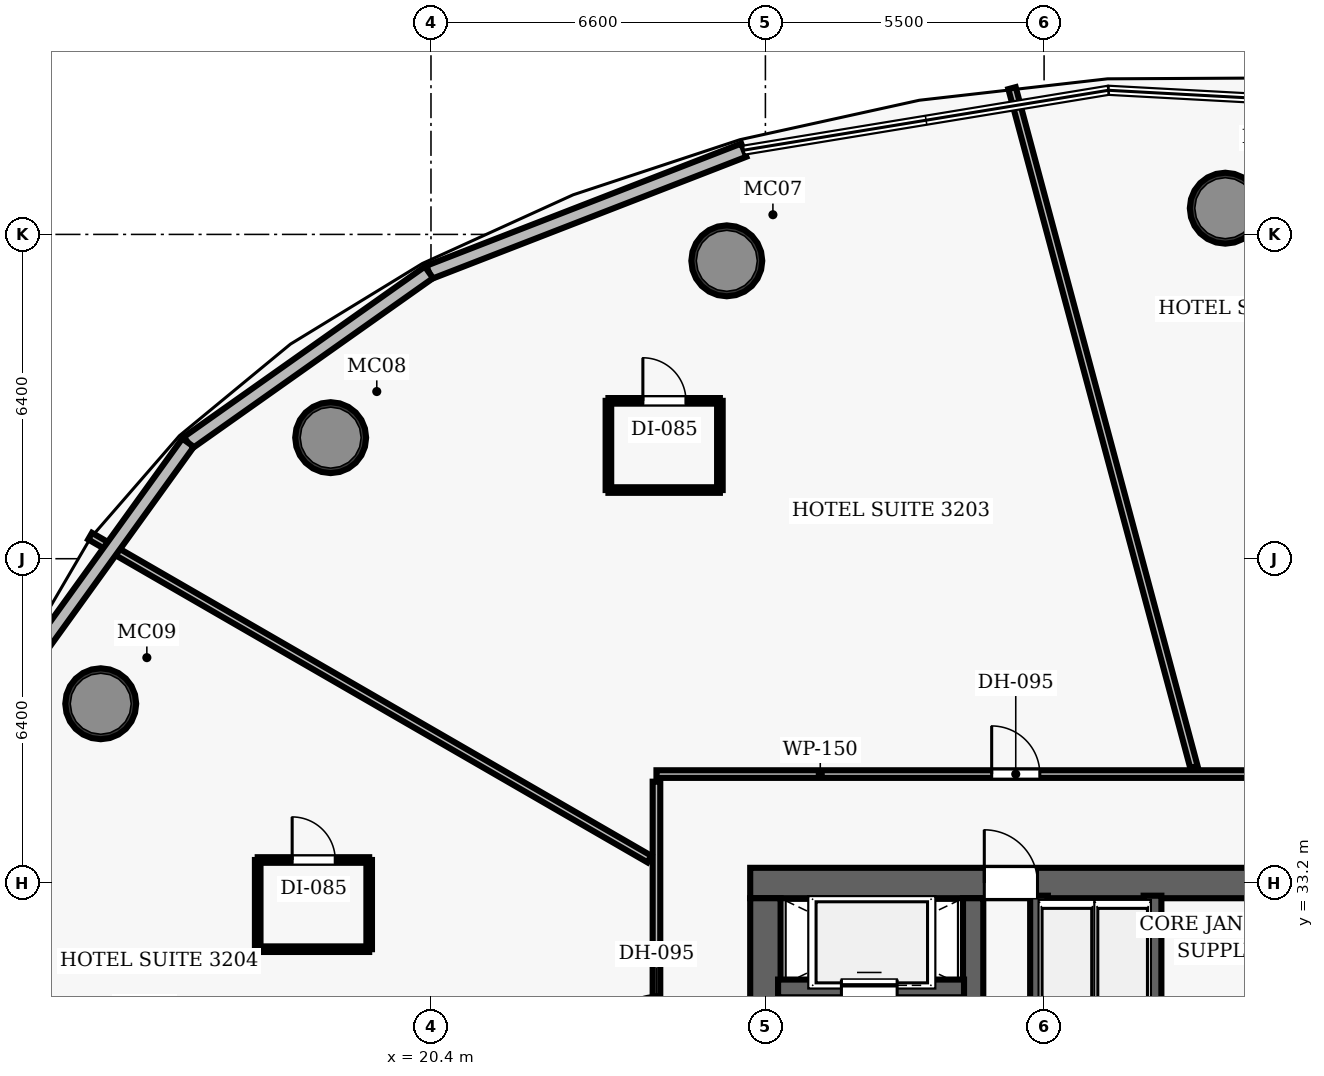
"""IFC4 building model, lengths in metres.
Left out: names, types, materials, properties, quantities, classifications, styles, units other than length and angle.
Written with IfcOpenShell. Run it as: python <this file> out.ifc"""

import sys

from ifc_helpers import new_model, si_unit, direction, frame, frame_2d, origin, origin_2d, place, context, subcontext, project, spatial, rectangle, hollow_circle, extrude, element, fill, save


model = new_model("IFC4")
c1 = context("Model", 3, precision=1e-05, world=origin(), true_north=direction((0.0, 1.0)))
c2 = subcontext(c1, "Body", "Model", "MODEL_VIEW")
j1 = project(units=[si_unit("LENGTHUNIT", "METRE"), si_unit("PLANEANGLEUNIT", "RADIAN")], contexts=[c1])
p1 = place(None, origin())
s1 = spatial("IfcSite", under=j1, at=p1, CompositionType="ELEMENT")
p2 = place(p1, origin())
s2 = spatial("IfcBuilding", under=s1, at=p2, CompositionType="ELEMENT")
p3 = place(p2, frame((0.0, 0.0, 130.8)))
s3 = spatial("IfcBuildingStorey", under=s2, at=p3, CompositionType="ELEMENT", Elevation=130.8)
p4 = place(p3, frame((26.7, 33.2, 0.0), z_axis=(0.0, 0.0, 1.0), x_axis=(1.0, 0.0, 0.0)))
e1 = element("IfcWall", 1, at=p4, inside=s3, PredefinedType="SHEAR", context=c2, shape_type="SweptSolid", body=[
    extrude(rectangle(XDim=22.6, YDim=0.6, at=frame_2d((11.3, 0.0))), origin(), (0.0, 0.0, 1.0), 3.5),
])
p5 = place(p4, frame((4.62, 0.0, 0.0)))
e2 = element("IfcOpeningElement", 2, at=p5, cuts=e1, PredefinedType="OPENING", context=c2, shape_type="SweptSolid", body=[
    extrude(rectangle(XDim=1.05, YDim=2.15, at=frame_2d((0.525, 1.075))), frame((0.0, 0.31, 0.0), z_axis=(0.0, -1.0, 0.0), x_axis=(1.0, 0.0, 0.0)), (0.0, 0.0, 1.0), 0.62),
])
p6 = place(p4, frame((14.52, 0.0, 0.0)))
e3 = element("IfcOpeningElement", 3, at=p6, cuts=e1, PredefinedType="OPENING", context=c2, shape_type="SweptSolid", body=[
    extrude(rectangle(XDim=1.05, YDim=2.15, at=frame_2d((0.525, 1.075))), frame((0.0, 0.31, 0.0), z_axis=(0.0, -1.0, 0.0), x_axis=(1.0, 0.0, 0.0)), (0.0, 0.0, 1.0), 0.62),
])
p7 = place(p3, frame((27.0, 19.1, 0.0), z_axis=(0.0, 0.0, 1.0), x_axis=(0.0, 1.0, 0.0)))
e4 = element("IfcWall", 4, at=p7, inside=s3, PredefinedType="SHEAR", context=c2, shape_type="SweptSolid", body=[
    extrude(rectangle(XDim=13.8, YDim=0.6, at=frame_2d((6.9, 0.0))), origin(), (0.0, 0.0, 1.0), 3.5),
])
p8 = place(p7, frame((8.2, 0.0, 0.0)))
e5 = element("IfcOpeningElement", 5, at=p8, cuts=e4, PredefinedType="OPENING", context=c2, shape_type="SweptSolid", body=[
    extrude(rectangle(XDim=1.05, YDim=2.15, at=frame_2d((0.525, 1.075))), frame((0.0, 0.31, 0.0), z_axis=(0.0, -1.0, 0.0), x_axis=(1.0, 0.0, 0.0)), (0.0, 0.0, 1.0), 0.62),
])
p9 = place(p3, frame((31.1, 19.1, 0.0), z_axis=(0.0, 0.0, 1.0), x_axis=(0.0, 1.0, 0.0)))
e6 = element("IfcWall", 6, at=p9, inside=s3, PredefinedType="SHEAR", context=c2, shape_type="SweptSolid", body=[
    extrude(rectangle(XDim=13.8, YDim=0.4, at=frame_2d((6.9, 0.0))), origin(), (0.0, 0.0, 1.0), 3.5),
])
for number, where, z_axis, x_axis in (
    (7, (36.076, 46.517, 0.0), (0.0, 0.0, 1.0), (1.0, 0.0, 0.0)),
    (8, (26.238, 45.479, 0.0), (0.0, 0.0, 1.0), (1.0, 0.0, 0.0)),
    (9, (18.42, 41.989, 0.0), (0.0, 0.0, 1.0), (1.0, 0.0, 0.0)),
    (10, (13.882, 36.738, 0.0), (0.0, 0.0, 1.0), (1.0, 0.0, 0.0)),
):
    element("IfcColumn", number, at=place(p3, frame(where, z_axis=z_axis, x_axis=x_axis)), inside=s3, PredefinedType="COLUMN", context=c2, shape_type="SweptSolid", body=[
        extrude(hollow_circle(Radius=0.7, WallThickness=0.055, at=origin_2d()), origin(), (0.0, 0.0, 1.0), 3.5),
    ])
p10 = place(p3, frame((27.25, 31.12, 0.0), z_axis=(0.0, 0.0, 1.0), x_axis=(1.0, 0.0, 0.0)))
e11 = element("IfcWall", 11, at=p10, inside=s3, PredefinedType="SHEAR", context=c2, shape_type="SweptSolid", body=[
    extrude(rectangle(XDim=3.67, YDim=0.35, at=frame_2d((1.835, 0.0))), origin(), (0.0, 0.0, 1.0), 2.675),
])
p11 = place(p10, frame((1.25, 0.0, 0.0)))
e12 = element("IfcOpeningElement", 12, at=p11, cuts=e11, PredefinedType="OPENING", context=c2, shape_type="SweptSolid", body=[
    extrude(rectangle(XDim=1.1, YDim=2.15, at=frame_2d((0.55, 1.075))), frame((0.0, 0.185, 0.0), z_axis=(0.0, -1.0, 0.0), x_axis=(1.0, 0.0, 0.0)), (0.0, 0.0, 1.0), 0.37),
])
p12 = place(p3, frame((34.64, 26.69, 0.0), z_axis=(0.0, 0.0, 1.0), x_axis=(0.0, 1.0, 0.0)))
e13 = element("IfcWall", 13, at=p12, inside=s3, PredefinedType="SHEAR", context=c2, shape_type="SweptSolid", body=[
    extrude(rectangle(XDim=6.26, YDim=0.35, at=frame_2d((3.13, 0.0))), origin(), (0.0, 0.0, 1.0), 3.5),
])
p13 = place(p3, frame((32.4, 30.22, 0.0), z_axis=(0.0, 0.0, 1.0), x_axis=(0.0, 1.0, 0.0)))
e14 = element("IfcWall", 14, at=p13, inside=s3, PredefinedType="SHEAR", context=c2, shape_type="SweptSolid", body=[
    extrude(rectangle(XDim=2.73, YDim=0.35, at=frame_2d((1.365, 0.0))), origin(), (0.0, 0.0, 1.0), 2.675),
])
p14 = place(p3, frame((24.85, 35.35, 0.0), z_axis=(0.0, 0.0, 1.0), x_axis=(1.0, 0.0, 0.0)))
e15 = element("IfcWall", 15, at=p14, inside=s3, PredefinedType="PARTITIONING", context=c2, shape_type="SweptSolid", body=[
    extrude(rectangle(XDim=26.0, YDim=0.15, at=frame_2d((13.0, 0.0))), origin(), (0.0, 0.0, 1.0), 2.675),
])
p15 = place(p14, frame((19.766, 0.0, 0.0)))
e16 = element("IfcOpeningElement", 16, at=p15, cuts=e15, PredefinedType="OPENING", context=c2, shape_type="SweptSolid", body=[
    extrude(rectangle(XDim=0.95, YDim=2.15, at=frame_2d((0.475, 1.075))), frame((0.0, 0.085, 0.0), z_axis=(0.0, -1.0, 0.0), x_axis=(1.0, 0.0, 0.0)), (0.0, 0.0, 1.0), 0.17),
])
p16 = place(p14, frame((12.852, 0.0, 0.0)))
e17 = element("IfcOpeningElement", 17, at=p16, cuts=e15, PredefinedType="OPENING", context=c2, shape_type="SweptSolid", body=[
    extrude(rectangle(XDim=0.95, YDim=2.15, at=frame_2d((0.475, 1.075))), frame((0.0, 0.085, 0.0), z_axis=(0.0, -1.0, 0.0), x_axis=(1.0, 0.0, 0.0)), (0.0, 0.0, 1.0), 0.17),
])
p17 = place(p14, frame((6.616, 0.0, 0.0)))
e18 = element("IfcOpeningElement", 18, at=p17, cuts=e15, PredefinedType="OPENING", context=c2, shape_type="SweptSolid", body=[
    extrude(rectangle(XDim=0.95, YDim=2.15, at=frame_2d((0.475, 1.075))), frame((0.0, 0.085, 0.0), z_axis=(0.0, -1.0, 0.0), x_axis=(1.0, 0.0, 0.0)), (0.0, 0.0, 1.0), 0.17),
])
p18 = place(p3, frame((24.85, 27.08, 0.0), z_axis=(0.0, 0.0, 1.0), x_axis=(0.0, 1.0, 0.0)))
e19 = element("IfcWall", 19, at=p18, inside=s3, PredefinedType="PARTITIONING", context=c2, shape_type="SweptSolid", body=[
    extrude(rectangle(XDim=8.12, YDim=0.15, at=frame_2d((4.06, 0.0))), origin(), (0.0, 0.0, 1.0), 2.675),
])
p19 = place(p18, frame((2.966, 0.0, 0.0)))
e20 = element("IfcOpeningElement", 20, at=p19, cuts=e19, PredefinedType="OPENING", context=c2, shape_type="SweptSolid", body=[
    extrude(rectangle(XDim=0.95, YDim=2.15, at=frame_2d((0.475, 1.075))), frame((0.0, 0.085, 0.0), z_axis=(0.0, -1.0, 0.0), x_axis=(1.0, 0.0, 0.0)), (0.0, 0.0, 1.0), 0.17),
])
p20 = place(p3, frame((35.457, 35.49, 0.0), z_axis=(0.0, 0.0, 1.0), x_axis=(-0.258816153921, 0.965926600974, 0.0)))
e21 = element("IfcWall", 21, at=p20, inside=s3, PredefinedType="PARTITIONING", context=c2, shape_type="SweptSolid", body=[
    extrude(rectangle(XDim=13.869, YDim=0.15, at=frame_2d((6.935, 0.0))), origin(), (0.0, 0.0, 1.0), 2.675),
])
p21 = place(p3, frame((24.71, 33.673, 0.0), z_axis=(0.0, 0.0, 1.0), x_axis=(-0.866028956608, 0.499993846279, 0.0)))
e22 = element("IfcWall", 22, at=p21, inside=s3, PredefinedType="PARTITIONING", context=c2, shape_type="SweptSolid", body=[
    extrude(rectangle(XDim=12.745, YDim=0.15, at=frame_2d((6.373, 0.0))), origin(), (0.0, 0.0, 1.0), 2.675),
])
p22 = place(p3, frame((23.902, 40.955, 0.0), z_axis=(0.0, 0.0, 1.0), x_axis=(1.0, 0.0, 0.0)))
e23 = element("IfcWall", 23, at=p22, inside=s3, PredefinedType="PARTITIONING", context=c2, shape_type="SweptSolid", body=[
    extrude(rectangle(XDim=2.2, YDim=0.11, at=frame_2d((1.1, 0.0))), origin(), (0.0, 0.0, 1.0), 2.675),
])
p23 = place(p3, frame((23.902, 42.715, 0.0), z_axis=(0.0, 0.0, 1.0), x_axis=(1.0, 0.0, 0.0)))
e24 = element("IfcWall", 24, at=p23, inside=s3, PredefinedType="PARTITIONING", context=c2, shape_type="SweptSolid", body=[
    extrude(rectangle(XDim=2.2, YDim=0.11, at=frame_2d((1.1, 0.0))), origin(), (0.0, 0.0, 1.0), 2.675),
])
p24 = place(p23, frame((0.68, 0.0, 0.0)))
e25 = element("IfcOpeningElement", 25, at=p24, cuts=e24, PredefinedType="OPENING", context=c2, shape_type="SweptSolid", body=[
    extrude(rectangle(XDim=0.85, YDim=2.1, at=frame_2d((0.425, 1.05))), frame((0.0, 0.065, 0.0), z_axis=(0.0, -1.0, 0.0), x_axis=(1.0, 0.0, 0.0)), (0.0, 0.0, 1.0), 0.13),
])
for number, where, z_axis, x_axis in (
    (26, (23.902, 40.955, 0.0), (0.0, 0.0, 1.0), (0.0, 1.0, 0.0)),
    (27, (26.102, 40.955, 0.0), (0.0, 0.0, 1.0), (0.0, 1.0, 0.0)),
):
    element("IfcWall", number, at=place(p3, frame(where, z_axis=z_axis, x_axis=x_axis)), inside=s3, PredefinedType="PARTITIONING", context=c2, shape_type="SweptSolid", body=[
        extrude(rectangle(XDim=1.76, YDim=0.11, at=frame_2d((0.88, 0.0))), origin(), (0.0, 0.0, 1.0), 2.675),
    ])
p25 = place(p3, frame((16.98, 31.894, 0.0), z_axis=(0.0, 0.0, 1.0), x_axis=(1.0, 0.0, 0.0)))
e28 = element("IfcWall", 28, at=p25, inside=s3, PredefinedType="PARTITIONING", context=c2, shape_type="SweptSolid", body=[
    extrude(rectangle(XDim=2.2, YDim=0.11, at=frame_2d((1.1, 0.0))), origin(), (0.0, 0.0, 1.0), 2.675),
])
p26 = place(p3, frame((16.98, 33.654, 0.0), z_axis=(0.0, 0.0, 1.0), x_axis=(1.0, 0.0, 0.0)))
e29 = element("IfcWall", 29, at=p26, inside=s3, PredefinedType="PARTITIONING", context=c2, shape_type="SweptSolid", body=[
    extrude(rectangle(XDim=2.2, YDim=0.11, at=frame_2d((1.1, 0.0))), origin(), (0.0, 0.0, 1.0), 2.675),
])
p27 = place(p26, frame((0.68, 0.0, 0.0)))
e30 = element("IfcOpeningElement", 30, at=p27, cuts=e29, PredefinedType="OPENING", context=c2, shape_type="SweptSolid", body=[
    extrude(rectangle(XDim=0.85, YDim=2.1, at=frame_2d((0.425, 1.05))), frame((0.0, 0.065, 0.0), z_axis=(0.0, -1.0, 0.0), x_axis=(1.0, 0.0, 0.0)), (0.0, 0.0, 1.0), 0.13),
])
for number, where, z_axis, x_axis in (
    (31, (16.98, 31.894, 0.0), (0.0, 0.0, 1.0), (0.0, 1.0, 0.0)),
    (32, (19.18, 31.894, 0.0), (0.0, 0.0, 1.0), (0.0, 1.0, 0.0)),
):
    element("IfcWall", number, at=place(p3, frame(where, z_axis=z_axis, x_axis=x_axis)), inside=s3, PredefinedType="PARTITIONING", context=c2, shape_type="SweptSolid", body=[
        extrude(rectangle(XDim=1.76, YDim=0.11, at=frame_2d((0.88, 0.0))), origin(), (0.0, 0.0, 1.0), 2.675),
    ])
p28 = place(p3, frame((20.36, 45.251, 0.0), z_axis=(0.0, 0.0, 1.0), x_axis=(0.932242322599, 0.361834564347, 0.0)))
e33 = element("IfcWall", 33, at=p28, inside=s3, PredefinedType="SOLIDWALL", context=c2, shape_type="SweptSolid", body=[
    extrude(rectangle(XDim=6.665, YDim=0.28, at=frame_2d((3.333, 0.0))), origin(), (0.0, 0.0, 1.0), 3.26),
])
p29 = place(p3, frame((15.605, 41.89, 0.0), z_axis=(0.0, 0.0, 1.0), x_axis=(0.816587720418, 0.577221356901, 0.0)))
e34 = element("IfcWall", 34, at=p29, inside=s3, PredefinedType="SOLIDWALL", context=c2, shape_type="SweptSolid", body=[
    extrude(rectangle(XDim=5.823, YDim=0.28, at=frame_2d((2.911, 0.0))), origin(), (0.0, 0.0, 1.0), 3.26),
])
p30 = place(p3, frame((12.58, 37.692, 0.0), z_axis=(0.0, 0.0, 1.0), x_axis=(0.584634057869, 0.811297120899, 0.0)))
e35 = element("IfcWall", 35, at=p30, inside=s3, PredefinedType="SOLIDWALL", context=c2, shape_type="SweptSolid", body=[
    extrude(rectangle(XDim=5.174, YDim=0.28, at=frame_2d((2.587, 0.0))), origin(), (0.0, 0.0, 1.0), 3.26),
])
p31 = place(p5, origin())
e36 = element("IfcDoor", 36, at=p31, inside=s3, OperationType="SINGLE_SWING_LEFT", PredefinedType="DOOR", context=c2, shape_type="SweptSolid", body=[
    extrude(rectangle(XDim=1.05, YDim=2.15, at=frame_2d((0.525, 1.075))), frame((0.0, 0.025, 0.0), z_axis=(0.0, -1.0, 0.0), x_axis=(1.0, 0.0, 0.0)), (0.0, 0.0, 1.0), 0.05),
])
fill(e2, e36)
p32 = place(p17, origin())
e37 = element("IfcDoor", 37, at=p32, inside=s3, OperationType="SINGLE_SWING_LEFT", PredefinedType="DOOR", context=c2, shape_type="SweptSolid", body=[
    extrude(rectangle(XDim=0.95, YDim=2.15, at=frame_2d((0.475, 1.075))), frame((0.0, 0.025, 0.0), z_axis=(0.0, -1.0, 0.0), x_axis=(1.0, 0.0, 0.0)), (0.0, 0.0, 1.0), 0.05),
])
fill(e18, e37)
p33 = place(p24, origin())
e38 = element("IfcDoor", 38, at=p33, inside=s3, OperationType="SINGLE_SWING_LEFT", PredefinedType="DOOR", context=c2, shape_type="SweptSolid", body=[
    extrude(rectangle(XDim=0.85, YDim=2.1, at=frame_2d((0.425, 1.05))), frame((0.0, 0.025, 0.0), z_axis=(0.0, -1.0, 0.0), x_axis=(1.0, 0.0, 0.0)), (0.0, 0.0, 1.0), 0.05),
])
fill(e25, e38)
p34 = place(p19, origin())
e39 = element("IfcDoor", 39, at=p34, inside=s3, OperationType="SINGLE_SWING_LEFT", PredefinedType="DOOR", context=c2, shape_type="SweptSolid", body=[
    extrude(rectangle(XDim=0.95, YDim=2.15, at=frame_2d((0.475, 1.075))), frame((0.0, 0.025, 0.0), z_axis=(0.0, -1.0, 0.0), x_axis=(1.0, 0.0, 0.0)), (0.0, 0.0, 1.0), 0.05),
])
fill(e20, e39)
p35 = place(p27, origin())
e40 = element("IfcDoor", 40, at=p35, inside=s3, OperationType="SINGLE_SWING_LEFT", PredefinedType="DOOR", context=c2, shape_type="SweptSolid", body=[
    extrude(rectangle(XDim=0.85, YDim=2.1, at=frame_2d((0.425, 1.05))), frame((0.0, 0.025, 0.0), z_axis=(0.0, -1.0, 0.0), x_axis=(1.0, 0.0, 0.0)), (0.0, 0.0, 1.0), 0.05),
])
fill(e30, e40)
p36 = place(p11, origin())
e41 = element("IfcDoor", 41, at=p36, inside=s3, OperationType="SLIDING_TO_LEFT", PredefinedType="DOOR", context=c2, shape_type="SweptSolid", body=[
    extrude(rectangle(XDim=1.1, YDim=2.15, at=frame_2d((0.55, 1.075))), frame((0.0, 0.025, 0.0), z_axis=(0.0, -1.0, 0.0), x_axis=(1.0, 0.0, 0.0)), (0.0, 0.0, 1.0), 0.05),
])
fill(e12, e41)
save(model, sys.argv[1])
